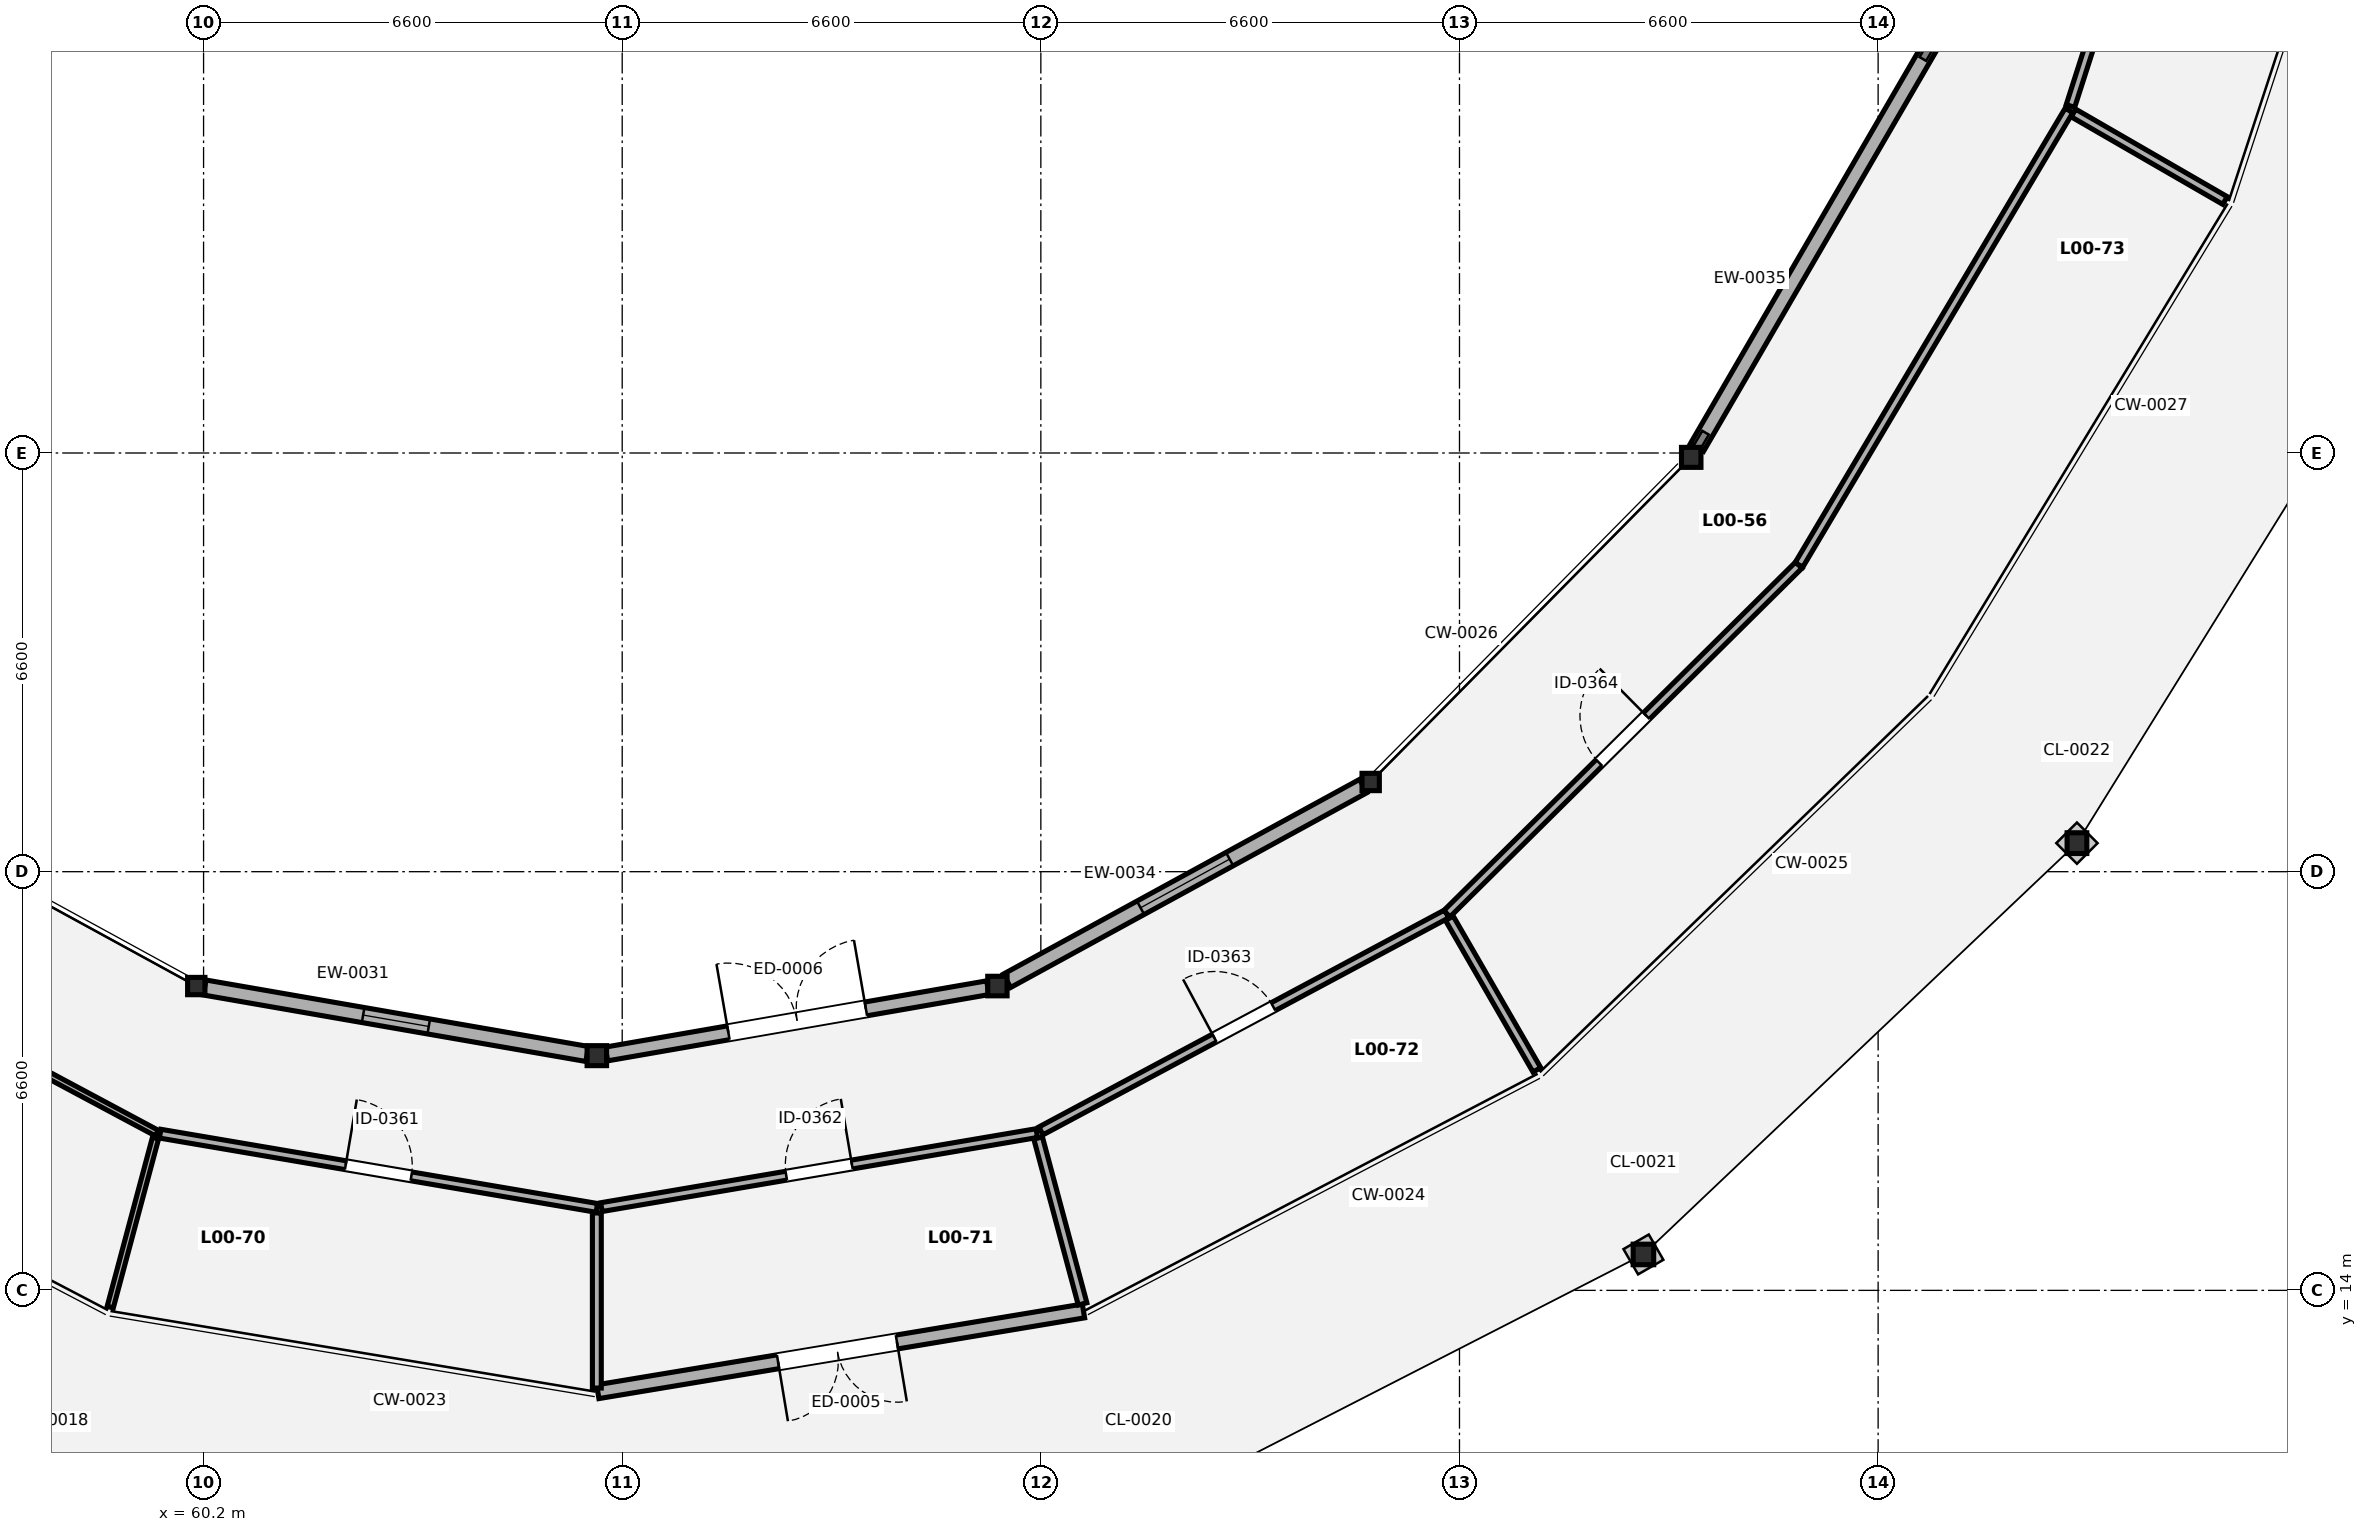
"""IFC4 building model, lengths in metres.
Left out: names, types, materials, properties, quantities, classifications, styles, units other than length and angle.
Written with IfcOpenShell. Run it as: python <this file> out.ifc"""

import sys

from ifc_helpers import new_model, si_unit, direction, frame, frame_2d, origin, origin_2d, place, context, subcontext, project, spatial, rectangle, hollow_circle, i_section, extrude, element, fill, save


model = new_model("IFC4")
c1 = context("Model", 3, precision=1e-05, world=origin(), true_north=direction((0.0, 1.0)))
c2 = subcontext(c1, "Body", "Model", "MODEL_VIEW")
j1 = project(units=[si_unit("LENGTHUNIT", "METRE"), si_unit("PLANEANGLEUNIT", "RADIAN")], contexts=[c1])
p1 = place(None, origin())
s1 = spatial("IfcSite", under=j1, at=p1, CompositionType="ELEMENT")
p2 = place(p1, origin())
s2 = spatial("IfcBuilding", under=s1, at=p2, CompositionType="ELEMENT")
p3 = place(p2, origin())
s3 = spatial("IfcBuildingStorey", under=s2, at=p3, CompositionType="ELEMENT", Elevation=0.0)
p4 = place(p3, frame((60.085, 18.797, 0.0), z_axis=(0.0, 0.0, 1.0), x_axis=(1.0, 0.0, 0.0)))
e1 = element("IfcColumn", 1, at=p4, inside=s3, PredefinedType="COLUMN", context=c2, shape_type="SweptSolid", body=[
    extrude(hollow_circle(Radius=0.136, WallThickness=0.009, at=origin_2d()), origin(), (0.0, 0.0, 1.0), 4.9),
])
p5 = place(p3, frame((66.4, 17.7, 0.0), z_axis=(0.0, 0.0, 1.0), x_axis=(1.0, 0.0, 0.0)))
e2 = element("IfcColumn", 2, at=p5, inside=s3, PredefinedType="COLUMN", context=c2, shape_type="SweptSolid", body=[
    extrude(i_section(OverallWidth=0.307, OverallDepth=0.315, WebThickness=0.012, FlangeThickness=0.019, FilletRadius=0.017, at=origin_2d()), origin(), (0.0, 0.0, 1.0), 4.9),
])
p6 = place(p3, frame((72.715, 18.797, 0.0), z_axis=(0.0, 0.0, 1.0), x_axis=(1.0, 0.0, 0.0)))
e3 = element("IfcColumn", 3, at=p6, inside=s3, PredefinedType="COLUMN", context=c2, shape_type="SweptSolid", body=[
    extrude(i_section(OverallWidth=0.305, OverallDepth=0.308, WebThickness=0.01, FlangeThickness=0.015, FilletRadius=0.017, at=origin_2d()), origin(), (0.0, 0.0, 1.0), 4.9),
])
p7 = place(p3, frame((82.9, 14.566, 0.0), z_axis=(0.0, 0.0, 1.0), x_axis=(1.0, 0.0, 0.0)))
e4 = element("IfcColumn", 4, at=p7, inside=s3, PredefinedType="COLUMN", context=c2, shape_type="SweptSolid", body=[
    extrude(hollow_circle(Radius=0.162, WallThickness=0.013, at=origin_2d()), origin(), (0.0, 0.0, 1.0), 4.9),
])
p8 = place(p3, frame((78.6, 22.014, 0.0), z_axis=(0.0, 0.0, 1.0), x_axis=(1.0, 0.0, 0.0)))
e5 = element("IfcColumn", 5, at=p8, inside=s3, PredefinedType="COLUMN", context=c2, shape_type="SweptSolid", body=[
    extrude(hollow_circle(Radius=0.136, WallThickness=0.009, at=origin_2d()), origin(), (0.0, 0.0, 1.0), 4.9),
])
p9 = place(p3, frame((89.735, 21.05, 0.0), z_axis=(0.0, 0.0, 1.0), x_axis=(1.0, 0.0, 0.0)))
e6 = element("IfcColumn", 6, at=p9, inside=s3, PredefinedType="COLUMN", context=c2, shape_type="SweptSolid", body=[
    extrude(i_section(OverallWidth=0.311, OverallDepth=0.327, WebThickness=0.016, FlangeThickness=0.025, FilletRadius=0.017, at=origin_2d()), origin(), (0.0, 0.0, 1.0), 4.9),
])
p10 = place(p3, frame((83.653, 27.131, 0.0), z_axis=(0.0, 0.0, 1.0), x_axis=(1.0, 0.0, 0.0)))
e7 = element("IfcColumn", 7, at=p10, inside=s3, PredefinedType="COLUMN", context=c2, shape_type="SweptSolid", body=[
    extrude(i_section(OverallWidth=0.307, OverallDepth=0.315, WebThickness=0.012, FlangeThickness=0.019, FilletRadius=0.017, at=origin_2d()), origin(), (0.0, 0.0, 1.0), 4.9),
])
p11 = place(p3, frame((60.217, 18.774, 0.0), z_axis=(0.0, 0.0, 1.0), x_axis=(0.985241011519, -0.171172863562, 0.0)))
e8 = element("IfcWall", 8, at=p11, inside=s3, PredefinedType="SOLIDWALL", context=c2, shape_type="SweptSolid", body=[
    extrude(rectangle(XDim=6.122, YDim=0.24, at=frame_2d((3.061, 0.0))), origin(), (0.0, 0.0, 1.0), 4.35),
])
p12 = place(p11, frame((2.536, 0.0, 0.85)))
e9 = element("IfcOpeningElement", 9, at=p12, cuts=e8, PredefinedType="OPENING", context=c2, shape_type="SweptSolid", body=[
    extrude(rectangle(XDim=1.05, YDim=1.35, at=frame_2d((0.525, 0.675))), frame((0.0, 0.13, 0.0), z_axis=(0.0, -1.0, 0.0), x_axis=(1.0, 0.0, 0.0)), (0.0, 0.0, 1.0), 0.26),
])
p13 = place(p3, frame((74.072, 13.675, 0.0), z_axis=(0.0, 0.0, 1.0), x_axis=(-0.98646693143, -0.163960340312, 0.0)))
e10 = element("IfcWall", 10, at=p13, inside=s3, PredefinedType="SOLIDWALL", context=c2, shape_type="SweptSolid", body=[
    extrude(rectangle(XDim=7.762, YDim=0.22, at=frame_2d((3.881, 0.0))), origin(), (0.0, 0.0, 1.0), 4.68),
])
p14 = place(p13, frame((2.981, 0.0, 0.0)))
e11 = element("IfcOpeningElement", 11, at=p14, cuts=e10, PredefinedType="OPENING", context=c2, shape_type="SweptSolid", body=[
    extrude(rectangle(XDim=1.9, YDim=2.2, at=frame_2d((0.95, 1.1))), frame((0.0, 0.12, 0.0), z_axis=(0.0, -1.0, 0.0), x_axis=(1.0, 0.0, 0.0)), (0.0, 0.0, 1.0), 0.24),
])
p15 = place(p3, frame((66.552, 17.726, 0.0), z_axis=(0.0, 0.0, 1.0), x_axis=(0.985241979296, 0.171167293114, 0.0)))
e12 = element("IfcWall", 12, at=p15, inside=s3, PredefinedType="SOLIDWALL", context=c2, shape_type="SweptSolid", body=[
    extrude(rectangle(XDim=6.103, YDim=0.22, at=frame_2d((3.052, 0.0))), origin(), (0.0, 0.0, 1.0), 4.35),
])
p16 = place(p15, frame((1.952, 0.0, 0.0)))
e13 = element("IfcOpeningElement", 13, at=p16, cuts=e12, PredefinedType="OPENING", context=c2, shape_type="SweptSolid", body=[
    extrude(rectangle(XDim=2.2, YDim=2.15, at=frame_2d((1.1, 1.075))), frame((0.0, 0.12, 0.0), z_axis=(0.0, -1.0, 0.0), x_axis=(1.0, 0.0, 0.0)), (0.0, 0.0, 1.0), 0.24),
])
p17 = place(p3, frame((72.866, 18.88, 0.0), z_axis=(0.0, 0.0, 1.0), x_axis=(0.877463709328, 0.479643032695, 0.0)))
e14 = element("IfcWall", 14, at=p17, inside=s3, PredefinedType="SOLIDWALL", context=c2, shape_type="SweptSolid", body=[
    extrude(rectangle(XDim=6.4, YDim=0.24, at=frame_2d((3.2, 0.0))), origin(), (0.0, 0.0, 1.0), 4.35),
])
p18 = place(p17, frame((2.4, 0.0, 0.85)))
e15 = element("IfcOpeningElement", 15, at=p18, cuts=e14, PredefinedType="OPENING", context=c2, shape_type="SweptSolid", body=[
    extrude(rectangle(XDim=1.6, YDim=1.5, at=frame_2d((0.8, 0.75))), frame((0.0, 0.13, 0.0), z_axis=(0.0, -1.0, 0.0), x_axis=(1.0, 0.0, 0.0)), (0.0, 0.0, 1.0), 0.26),
])
p19 = place(p3, frame((83.744, 27.287, 0.0), z_axis=(0.0, 0.0, 1.0), x_axis=(0.50266774775, 0.864479690549, 0.0)))
e16 = element("IfcWall", 16, at=p19, inside=s3, PredefinedType="SOLIDWALL", context=c2, shape_type="SweptSolid", body=[
    extrude(rectangle(XDim=7.358, YDim=0.24, at=frame_2d((3.679, 0.0))), origin(), (0.0, 0.0, 1.0), 4.35),
])
p20 = place(p3, frame((53.063, 19.902, 0.0), z_axis=(0.0, 0.0, 1.0), x_axis=(0.881826283139, -0.471574391125, 0.0)))
e17 = element("IfcWall", 17, at=p20, inside=s3, PredefinedType="PARTITIONING", context=c2, shape_type="SweptSolid", body=[
    extrude(rectangle(XDim=7.258, YDim=0.1, at=frame_2d((3.629, 0.0))), origin(), (0.0, 0.0, 1.0), 4.7),
])
p21 = place(p20, frame((3.129, 0.0, 0.0)))
e18 = element("IfcOpeningElement", 18, at=p21, cuts=e17, PredefinedType="OPENING", context=c2, shape_type="SweptSolid", body=[
    extrude(rectangle(XDim=1.0, YDim=2.1, at=frame_2d((0.5, 1.05))), frame((0.0, 0.06, 0.0), z_axis=(0.0, -1.0, 0.0), x_axis=(1.0, 0.0, 0.0)), (0.0, 0.0, 1.0), 0.12),
])
p22 = place(p3, frame((59.443, 16.402, 0.0), z_axis=(0.0, 0.0, 1.0), x_axis=(-0.258840732966, -0.965920014783, 0.0)))
e19 = element("IfcWall", 19, at=p22, inside=s3, PredefinedType="PARTITIONING", context=c2, shape_type="SweptSolid", body=[
    extrude(rectangle(XDim=2.76, YDim=0.1, at=frame_2d((1.38, 0.0))), origin(), (0.0, 0.0, 1.0), 4.023),
])
p23 = place(p3, frame((59.515, 16.47, 0.0), z_axis=(0.0, 0.0, 1.0), x_axis=(0.985861622289, -0.167561516157, 0.0)))
e20 = element("IfcWall", 20, at=p23, inside=s3, PredefinedType="PARTITIONING", context=c2, shape_type="SweptSolid", body=[
    extrude(rectangle(XDim=6.983, YDim=0.14, at=frame_2d((3.492, 0.0))), origin(), (0.0, 0.0, 1.0), 4.7),
])
p24 = place(p23, frame((2.967, 0.0, 0.0)))
e21 = element("IfcOpeningElement", 21, at=p24, cuts=e20, PredefinedType="OPENING", context=c2, shape_type="SweptSolid", body=[
    extrude(rectangle(XDim=1.05, YDim=2.15, at=frame_2d((0.525, 1.075))), frame((0.0, 0.08, 0.0), z_axis=(0.0, -1.0, 0.0), x_axis=(1.0, 0.0, 0.0)), (0.0, 0.0, 1.0), 0.16),
])
p25 = place(p3, frame((66.4, 15.22, 0.0), z_axis=(0.0, 0.0, 1.0), x_axis=(0.0, -1.0, 0.0)))
e22 = element("IfcWall", 22, at=p25, inside=s3, PredefinedType="PARTITIONING", context=c2, shape_type="SweptSolid", body=[
    extrude(rectangle(XDim=2.76, YDim=0.14, at=frame_2d((1.38, 0.0))), origin(), (0.0, 0.0, 1.0), 4.092),
])
p26 = place(p3, frame((66.472, 15.312, 0.0), z_axis=(0.0, 0.0, 1.0), x_axis=(0.985861002198, 0.167565164474, 0.0)))
e23 = element("IfcWall", 23, at=p26, inside=s3, PredefinedType="PARTITIONING", context=c2, shape_type="SweptSolid", body=[
    extrude(rectangle(XDim=6.963, YDim=0.14, at=frame_2d((3.481, 0.0))), origin(), (0.0, 0.0, 1.0), 4.7),
])
p27 = place(p26, frame((2.956, 0.0, 0.0)))
e24 = element("IfcOpeningElement", 24, at=p27, cuts=e23, PredefinedType="OPENING", context=c2, shape_type="SweptSolid", body=[
    extrude(rectangle(XDim=1.05, YDim=2.15, at=frame_2d((0.525, 1.075))), frame((0.0, 0.08, 0.0), z_axis=(0.0, -1.0, 0.0), x_axis=(1.0, 0.0, 0.0)), (0.0, 0.0, 1.0), 0.16),
])
p28 = place(p3, frame((73.357, 16.402, 0.0), z_axis=(0.0, 0.0, 1.0), x_axis=(0.25881872536, -0.965925911964, 0.0)))
e25 = element("IfcWall", 25, at=p28, inside=s3, PredefinedType="PARTITIONING", context=c2, shape_type="SweptSolid", body=[
    extrude(rectangle(XDim=2.707, YDim=0.14, at=frame_2d((1.354, 0.0))), origin(), (0.0, 0.0, 1.0), 4.092),
])
p29 = place(p3, frame((73.402, 16.514, 0.0), z_axis=(0.0, 0.0, 1.0), x_axis=(0.881829873621, 0.471567676999, 0.0)))
e26 = element("IfcWall", 26, at=p29, inside=s3, PredefinedType="PARTITIONING", context=c2, shape_type="SweptSolid", body=[
    extrude(rectangle(XDim=7.256, YDim=0.14, at=frame_2d((3.628, 0.0))), origin(), (0.0, 0.0, 1.0), 4.7),
])
p30 = place(p29, frame((3.103, 0.0, 0.0)))
e27 = element("IfcOpeningElement", 27, at=p30, cuts=e26, PredefinedType="OPENING", context=c2, shape_type="SweptSolid", body=[
    extrude(rectangle(XDim=1.05, YDim=2.15, at=frame_2d((0.525, 1.075))), frame((0.0, 0.08, 0.0), z_axis=(0.0, -1.0, 0.0), x_axis=(1.0, 0.0, 0.0)), (0.0, 0.0, 1.0), 0.16),
])
p31 = place(p3, frame((79.84, 19.866, 0.0), z_axis=(0.0, 0.0, 1.0), x_axis=(0.499982807329, -0.86603532975, 0.0)))
e28 = element("IfcWall", 28, at=p31, inside=s3, PredefinedType="PARTITIONING", context=c2, shape_type="SweptSolid", body=[
    extrude(rectangle(XDim=2.76, YDim=0.14, at=frame_2d((1.38, 0.0))), origin(), (0.0, 0.0, 1.0), 4.013),
])
p32 = place(p3, frame((79.802, 19.937, 0.0), z_axis=(0.0, 0.0, 1.0), x_axis=(0.710427757183, 0.703770134222, 0.0)))
e29 = element("IfcWall", 29, at=p32, inside=s3, PredefinedType="PARTITIONING", context=c2, shape_type="SweptSolid", body=[
    extrude(rectangle(XDim=7.811, YDim=0.14, at=frame_2d((3.905, 0.0))), origin(), (0.0, 0.0, 1.0), 4.7),
])
p33 = place(p32, frame((3.381, 0.0, 0.0)))
e30 = element("IfcOpeningElement", 30, at=p33, cuts=e29, PredefinedType="OPENING", context=c2, shape_type="SweptSolid", body=[
    extrude(rectangle(XDim=1.05, YDim=2.15, at=frame_2d((0.525, 1.075))), frame((0.0, 0.08, 0.0), z_axis=(0.0, -1.0, 0.0), x_axis=(1.0, 0.0, 0.0)), (0.0, 0.0, 1.0), 0.16),
])
p34 = place(p3, frame((85.352, 25.436, 0.0), z_axis=(0.0, 0.0, 1.0), x_axis=(0.510915698067, 0.859630821614, 0.0)))
e31 = element("IfcWall", 31, at=p34, inside=s3, PredefinedType="PARTITIONING", context=c2, shape_type="SweptSolid", body=[
    extrude(rectangle(XDim=8.334, YDim=0.14, at=frame_2d((4.167, 0.0))), origin(), (0.0, 0.0, 1.0), 4.7),
])
p35 = place(p3, frame((89.679, 32.56, 0.0), z_axis=(0.0, 0.0, 1.0), x_axis=(0.866019141083, -0.50001084716, 0.0)))
e32 = element("IfcWall", 32, at=p35, inside=s3, PredefinedType="PARTITIONING", context=c2, shape_type="SweptSolid", body=[
    extrude(rectangle(XDim=2.76, YDim=0.14, at=frame_2d((1.38, 0.0))), origin(), (0.0, 0.0, 1.0), 4.092),
])
p36 = place(p3, frame((89.632, 32.67, 0.0), z_axis=(0.0, 0.0, 1.0), x_axis=(0.305495322231, 0.952193577008, 0.0)))
e33 = element("IfcWall", 33, at=p36, inside=s3, PredefinedType="PARTITIONING", context=c2, shape_type="SweptSolid", body=[
    extrude(rectangle(XDim=8.69, YDim=0.14, at=frame_2d((4.345, 0.0))), origin(), (0.0, 0.0, 1.0), 4.7),
])
p37 = place(p36, frame((3.82, 0.0, 0.0)))
e34 = element("IfcOpeningElement", 34, at=p37, cuts=e33, PredefinedType="OPENING", context=c2, shape_type="SweptSolid", body=[
    extrude(rectangle(XDim=1.05, YDim=2.15, at=frame_2d((0.525, 1.075))), frame((0.0, 0.08, 0.0), z_axis=(0.0, -1.0, 0.0), x_axis=(1.0, 0.0, 0.0)), (0.0, 0.0, 1.0), 0.16),
])
p38 = place(p12, origin())
e35 = element("IfcWindow", 35, at=p38, inside=s3, PartitioningType="SINGLE_PANEL", PredefinedType="WINDOW", context=c2, shape_type="SweptSolid", body=[
    extrude(rectangle(XDim=1.05, YDim=1.35, at=frame_2d((0.525, 0.675))), frame((0.0, 0.03, 0.0), z_axis=(0.0, -1.0, 0.0), x_axis=(1.0, 0.0, 0.0)), (0.0, 0.0, 1.0), 0.06),
])
fill(e9, e35)
p39 = place(p14, origin())
e36 = element("IfcDoor", 36, at=p39, inside=s3, OperationType="DOUBLE_DOOR_SINGLE_SWING", PredefinedType="DOOR", context=c2, shape_type="SweptSolid", body=[
    extrude(rectangle(XDim=1.9, YDim=2.2, at=frame_2d((0.95, 1.1))), frame((0.0, 0.025, 0.0), z_axis=(0.0, -1.0, 0.0), x_axis=(1.0, 0.0, 0.0)), (0.0, 0.0, 1.0), 0.05),
])
fill(e11, e36)
p40 = place(p16, origin())
e37 = element("IfcDoor", 37, at=p40, inside=s3, OperationType="DOUBLE_DOOR_SINGLE_SWING", PredefinedType="GATE", context=c2, shape_type="SweptSolid", body=[
    extrude(rectangle(XDim=2.2, YDim=2.15, at=frame_2d((1.1, 1.075))), frame((0.0, 0.025, 0.0), z_axis=(0.0, -1.0, 0.0), x_axis=(1.0, 0.0, 0.0)), (0.0, 0.0, 1.0), 0.05),
])
fill(e13, e37)
p41 = place(p18, origin())
e38 = element("IfcWindow", 38, at=p41, inside=s3, PartitioningType="SINGLE_PANEL", PredefinedType="WINDOW", context=c2, shape_type="SweptSolid", body=[
    extrude(rectangle(XDim=1.6, YDim=1.5, at=frame_2d((0.8, 0.75))), frame((0.0, 0.03, 0.0), z_axis=(0.0, -1.0, 0.0), x_axis=(1.0, 0.0, 0.0)), (0.0, 0.0, 1.0), 0.06),
])
fill(e15, e38)
p42 = place(p24, origin())
e39 = element("IfcDoor", 39, at=p42, inside=s3, OperationType="SINGLE_SWING_LEFT", PredefinedType="DOOR", context=c2, shape_type="SweptSolid", body=[
    extrude(rectangle(XDim=1.05, YDim=2.15, at=frame_2d((0.525, 1.075))), frame((0.0, 0.025, 0.0), z_axis=(0.0, -1.0, 0.0), x_axis=(1.0, 0.0, 0.0)), (0.0, 0.0, 1.0), 0.05),
])
fill(e21, e39)
p43 = place(p27, origin())
e40 = element("IfcDoor", 40, at=p43, inside=s3, OperationType="SINGLE_SWING_RIGHT", PredefinedType="DOOR", context=c2, shape_type="SweptSolid", body=[
    extrude(rectangle(XDim=1.05, YDim=2.15, at=frame_2d((0.525, 1.075))), frame((0.0, 0.025, 0.0), z_axis=(0.0, -1.0, 0.0), x_axis=(1.0, 0.0, 0.0)), (0.0, 0.0, 1.0), 0.05),
])
fill(e24, e40)
p44 = place(p30, origin())
e41 = element("IfcDoor", 41, at=p44, inside=s3, OperationType="SINGLE_SWING_LEFT", PredefinedType="DOOR", context=c2, shape_type="SweptSolid", body=[
    extrude(rectangle(XDim=1.05, YDim=2.15, at=frame_2d((0.525, 1.075))), frame((0.0, 0.025, 0.0), z_axis=(0.0, -1.0, 0.0), x_axis=(1.0, 0.0, 0.0)), (0.0, 0.0, 1.0), 0.05),
])
fill(e27, e41)
p45 = place(p33, origin())
e42 = element("IfcDoor", 42, at=p45, inside=s3, OperationType="SINGLE_SWING_RIGHT", PredefinedType="DOOR", context=c2, shape_type="SweptSolid", body=[
    extrude(rectangle(XDim=1.05, YDim=2.15, at=frame_2d((0.525, 1.075))), frame((0.0, 0.025, 0.0), z_axis=(0.0, -1.0, 0.0), x_axis=(1.0, 0.0, 0.0)), (0.0, 0.0, 1.0), 0.05),
])
fill(e30, e42)
save(model, sys.argv[1])
